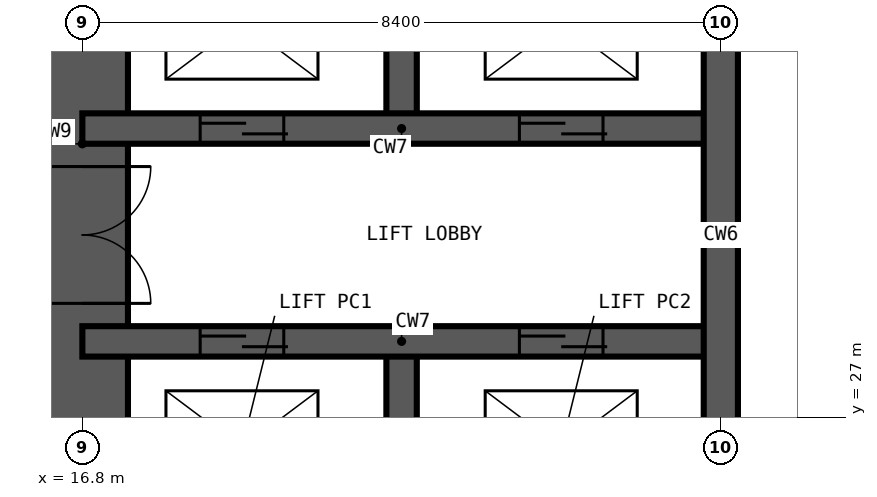
"""IFC4 building model, lengths in metres.
Left out: names, types, materials, properties, quantities, classifications, styles, units other than length and angle.
Written with IfcOpenShell. Run it as: python <this file> out.ifc"""

import sys

from ifc_helpers import new_model, si_unit, direction, frame, frame_2d, origin, place, context, subcontext, project, spatial, rectangle, extrude, element, fill, save


model = new_model("IFC4")
c1 = context("Model", 3, precision=1e-05, world=origin(), true_north=direction((0.0, 1.0)))
c2 = subcontext(c1, "Body", "Model", "MODEL_VIEW")
j1 = project(units=[si_unit("LENGTHUNIT", "METRE"), si_unit("PLANEANGLEUNIT", "RADIAN")], contexts=[c1])
p1 = place(None, origin())
s1 = spatial("IfcSite", under=j1, at=p1, CompositionType="ELEMENT")
p2 = place(p1, origin())
s2 = spatial("IfcBuilding", under=s1, at=p2, CompositionType="ELEMENT")
p3 = place(p2, frame((0.0, 0.0, 147.6)))
s3 = spatial("IfcBuildingStorey", under=s2, at=p3, CompositionType="ELEMENT", Elevation=147.6)
p4 = place(p3, frame((16.8, 41.4, -0.35), z_axis=(0.0, 0.0, 1.0), x_axis=(0.0, -1.0, 0.0)))
e1 = element("IfcWall", 1, at=p4, inside=s3, PredefinedType="SHEAR", context=c2, shape_type="SweptSolid", body=[
    extrude(rectangle(XDim=24.0, YDim=1.2, at=frame_2d((12.0, 0.0))), origin(), (0.0, 0.0, 1.0), 5.95),
])
p5 = place(p4, frame((11.1, 0.0, 0.35)))
e2 = element("IfcOpeningElement", 2, at=p5, cuts=e1, PredefinedType="OPENING", context=c2, shape_type="SweptSolid", body=[
    extrude(rectangle(XDim=1.8, YDim=2.2, at=frame_2d((0.9, 1.1))), frame((0.0, 0.61, 0.0), z_axis=(0.0, -1.0, 0.0), x_axis=(1.0, 0.0, 0.0)), (0.0, 0.0, 1.0), 1.22),
])
p6 = place(p4, frame((19.5, 0.0, 0.35)))
e3 = element("IfcOpeningElement", 3, at=p6, cuts=e1, PredefinedType="OPENING", context=c2, shape_type="SweptSolid", body=[
    extrude(rectangle(XDim=1.8, YDim=2.2, at=frame_2d((0.9, 1.1))), frame((0.0, 0.61, 0.0), z_axis=(0.0, -1.0, 0.0), x_axis=(1.0, 0.0, 0.0)), (0.0, 0.0, 1.0), 1.22),
])
p7 = place(p4, frame((5.2, 0.0, 0.35)))
e4 = element("IfcOpeningElement", 4, at=p7, cuts=e1, PredefinedType="OPENING", context=c2, shape_type="SweptSolid", body=[
    extrude(rectangle(XDim=1.0, YDim=2.1, at=frame_2d((0.5, 1.05))), frame((0.0, 0.61, 0.0), z_axis=(0.0, -1.0, 0.0), x_axis=(1.0, 0.0, 0.0)), (0.0, 0.0, 1.0), 1.22),
])
p8 = place(p3, frame((21.0, 22.4, -0.35), z_axis=(0.0, 0.0, 1.0), x_axis=(0.0, 1.0, 0.0)))
e5 = element("IfcWall", 5, at=p8, inside=s3, PredefinedType="SHEAR", context=c2, shape_type="SweptSolid", body=[
    extrude(rectangle(XDim=5.6, YDim=0.4, at=frame_2d((2.8, 0.0))), origin(), (0.0, 0.0, 1.0), 5.95),
])
p9 = place(p3, frame((21.0, 30.8, -0.35), z_axis=(0.0, 0.0, 1.0), x_axis=(0.0, 1.0, 0.0)))
e6 = element("IfcWall", 6, at=p9, inside=s3, PredefinedType="SHEAR", context=c2, shape_type="SweptSolid", body=[
    extrude(rectangle(XDim=2.8, YDim=0.4, at=frame_2d((1.4, 0.0))), origin(), (0.0, 0.0, 1.0), 5.95),
])
p10 = place(p3, frame((16.8, 28.0, -0.35), z_axis=(0.0, 0.0, 1.0), x_axis=(1.0, 0.0, 0.0)))
e7 = element("IfcWall", 7, at=p10, inside=s3, PredefinedType="SHEAR", context=c2, shape_type="SweptSolid", body=[
    extrude(rectangle(XDim=8.4, YDim=0.4, at=frame_2d((4.2, 0.0))), origin(), (0.0, 0.0, 1.0), 5.95),
])
p11 = place(p10, frame((1.55, 0.0, 0.35)))
e8 = element("IfcOpeningElement", 8, at=p11, cuts=e7, PredefinedType="OPENING", context=c2, shape_type="SweptSolid", body=[
    extrude(rectangle(XDim=1.1, YDim=2.2, at=frame_2d((0.55, 1.1))), frame((0.0, 0.21, 0.0), z_axis=(0.0, -1.0, 0.0), x_axis=(1.0, 0.0, 0.0)), (0.0, 0.0, 1.0), 0.42),
])
p12 = place(p10, frame((5.75, 0.0, 0.35)))
e9 = element("IfcOpeningElement", 9, at=p12, cuts=e7, PredefinedType="OPENING", context=c2, shape_type="SweptSolid", body=[
    extrude(rectangle(XDim=1.1, YDim=2.2, at=frame_2d((0.55, 1.1))), frame((0.0, 0.21, 0.0), z_axis=(0.0, -1.0, 0.0), x_axis=(1.0, 0.0, 0.0)), (0.0, 0.0, 1.0), 0.42),
])
p13 = place(p3, frame((16.8, 30.8, -0.35), z_axis=(0.0, 0.0, 1.0), x_axis=(1.0, 0.0, 0.0)))
e10 = element("IfcWall", 10, at=p13, inside=s3, PredefinedType="SHEAR", context=c2, shape_type="SweptSolid", body=[
    extrude(rectangle(XDim=8.4, YDim=0.4, at=frame_2d((4.2, 0.0))), origin(), (0.0, 0.0, 1.0), 5.95),
])
p14 = place(p13, frame((1.55, 0.0, 0.35)))
e11 = element("IfcOpeningElement", 11, at=p14, cuts=e10, PredefinedType="OPENING", context=c2, shape_type="SweptSolid", body=[
    extrude(rectangle(XDim=1.1, YDim=2.2, at=frame_2d((0.55, 1.1))), frame((0.0, 0.21, 0.0), z_axis=(0.0, -1.0, 0.0), x_axis=(1.0, 0.0, 0.0)), (0.0, 0.0, 1.0), 0.42),
])
p15 = place(p13, frame((5.75, 0.0, 0.35)))
e12 = element("IfcOpeningElement", 12, at=p15, cuts=e10, PredefinedType="OPENING", context=c2, shape_type="SweptSolid", body=[
    extrude(rectangle(XDim=1.1, YDim=2.2, at=frame_2d((0.55, 1.1))), frame((0.0, 0.21, 0.0), z_axis=(0.0, -1.0, 0.0), x_axis=(1.0, 0.0, 0.0)), (0.0, 0.0, 1.0), 0.42),
])
p16 = place(p3, frame((25.2, 16.8, -0.35), z_axis=(0.0, 0.0, 1.0), x_axis=(0.0, 1.0, 0.0)))
e13 = element("IfcWall", 13, at=p16, inside=s3, PredefinedType="SHEAR", context=c2, shape_type="SweptSolid", body=[
    extrude(rectangle(XDim=25.2, YDim=0.45, at=frame_2d((12.6, 0.0))), origin(), (0.0, 0.0, 1.0), 5.95),
])
p17 = place(p11, origin())
e14 = element("IfcDoor", 14, at=p17, inside=s3, OperationType="DOUBLE_DOOR_SLIDING", PredefinedType="DOOR", context=c2, shape_type="SweptSolid", body=[
    extrude(rectangle(XDim=1.1, YDim=2.2, at=frame_2d((0.55, 1.1))), frame((0.0, 0.025, 0.0), z_axis=(0.0, -1.0, 0.0), x_axis=(1.0, 0.0, 0.0)), (0.0, 0.0, 1.0), 0.05),
])
fill(e8, e14)
p18 = place(p12, origin())
e15 = element("IfcDoor", 15, at=p18, inside=s3, OperationType="DOUBLE_DOOR_SLIDING", PredefinedType="DOOR", context=c2, shape_type="SweptSolid", body=[
    extrude(rectangle(XDim=1.1, YDim=2.2, at=frame_2d((0.55, 1.1))), frame((0.0, 0.025, 0.0), z_axis=(0.0, -1.0, 0.0), x_axis=(1.0, 0.0, 0.0)), (0.0, 0.0, 1.0), 0.05),
])
fill(e9, e15)
p19 = place(p14, origin())
e16 = element("IfcDoor", 16, at=p19, inside=s3, OperationType="DOUBLE_DOOR_SLIDING", PredefinedType="DOOR", context=c2, shape_type="SweptSolid", body=[
    extrude(rectangle(XDim=1.1, YDim=2.2, at=frame_2d((0.55, 1.1))), frame((0.0, 0.025, 0.0), z_axis=(0.0, -1.0, 0.0), x_axis=(1.0, 0.0, 0.0)), (0.0, 0.0, 1.0), 0.05),
])
fill(e11, e16)
p20 = place(p15, origin())
e17 = element("IfcDoor", 17, at=p20, inside=s3, OperationType="DOUBLE_DOOR_SLIDING", PredefinedType="DOOR", context=c2, shape_type="SweptSolid", body=[
    extrude(rectangle(XDim=1.1, YDim=2.2, at=frame_2d((0.55, 1.1))), frame((0.0, 0.025, 0.0), z_axis=(0.0, -1.0, 0.0), x_axis=(1.0, 0.0, 0.0)), (0.0, 0.0, 1.0), 0.05),
])
fill(e12, e17)
p21 = place(p5, origin())
e18 = element("IfcDoor", 18, at=p21, inside=s3, OperationType="DOUBLE_DOOR_DOUBLE_SWING", PredefinedType="DOOR", context=c2, shape_type="SweptSolid", body=[
    extrude(rectangle(XDim=1.8, YDim=2.2, at=frame_2d((0.9, 1.1))), frame((0.0, 0.025, 0.0), z_axis=(0.0, -1.0, 0.0), x_axis=(1.0, 0.0, 0.0)), (0.0, 0.0, 1.0), 0.05),
])
fill(e2, e18)
save(model, sys.argv[1])
